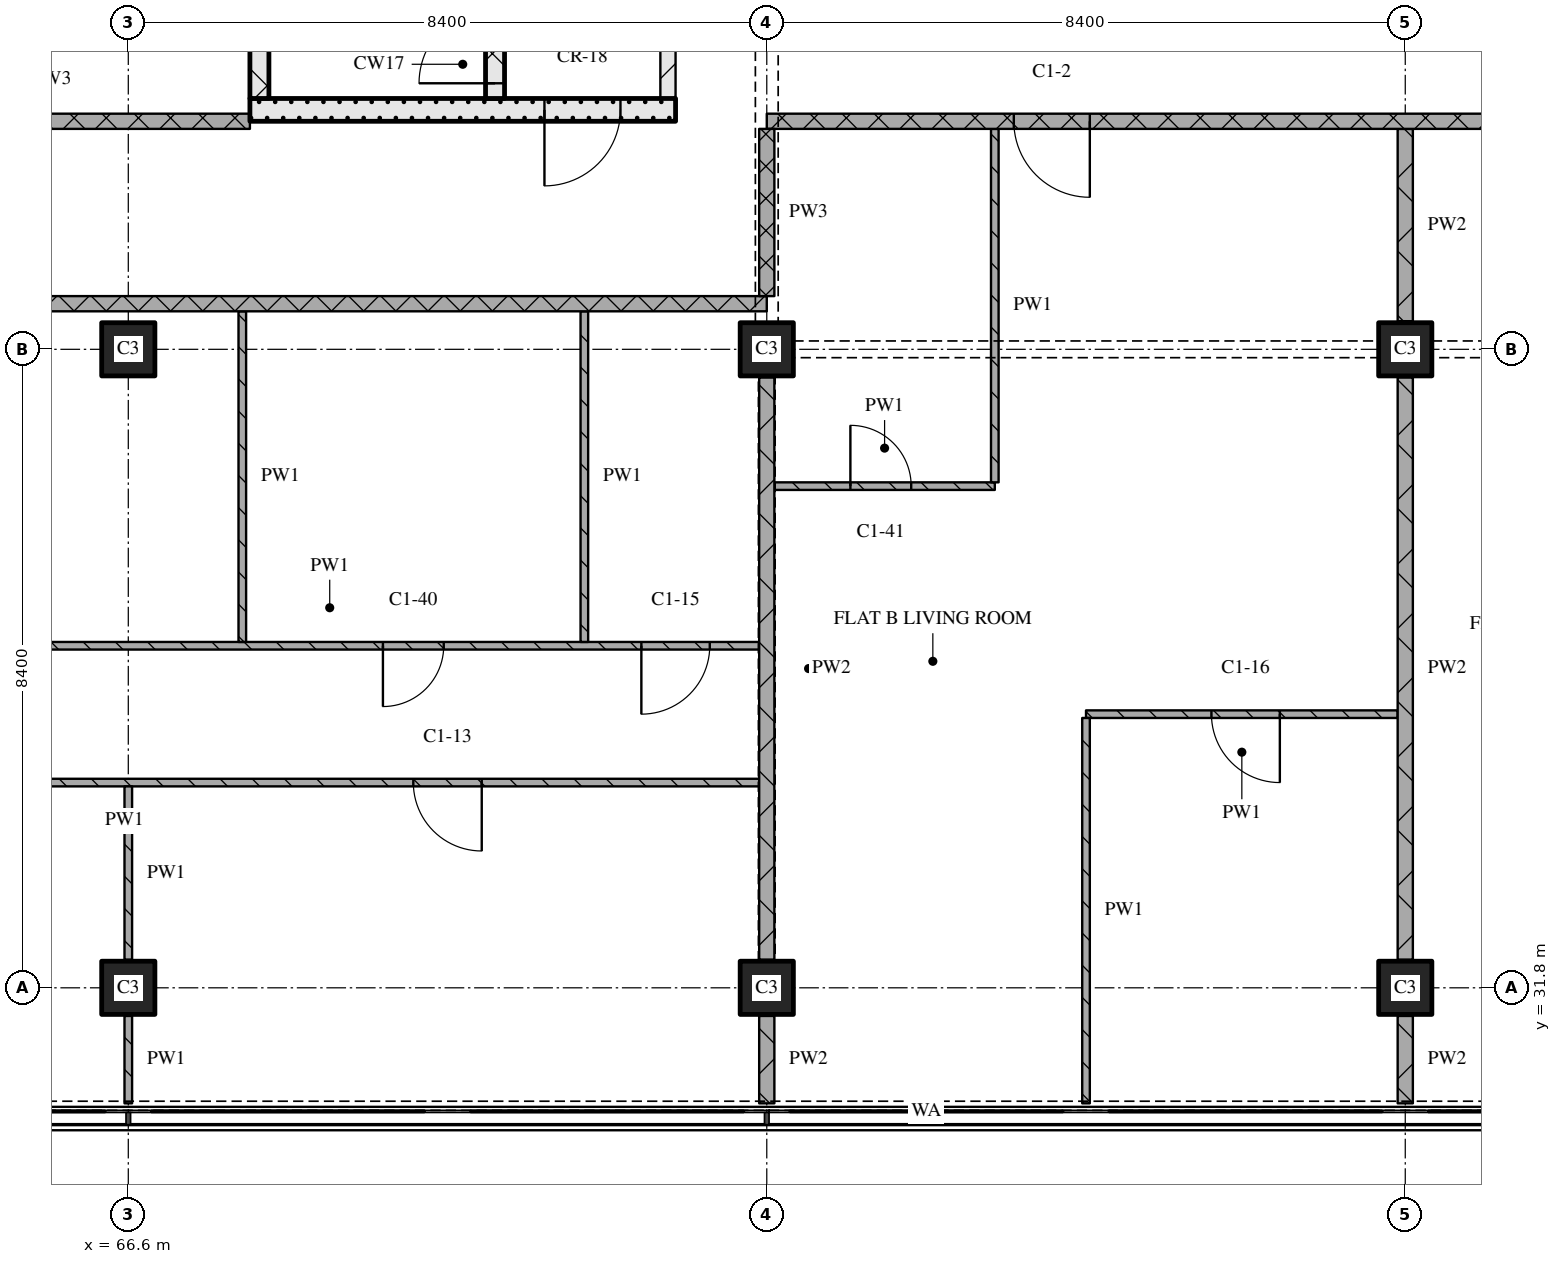
"""IFC4 building model, lengths in metres.
Left out: names, types, materials, properties, quantities, classifications, styles, units other than length and angle.
Written with IfcOpenShell. Run it as: python <this file> out.ifc"""

import sys

from ifc_helpers import new_model, si_unit, direction, frame, frame_2d, origin, origin_2d, place, context, subcontext, project, spatial, rectangle, extrude, element, fill, save


model = new_model("IFC4")
c1 = context("Model", 3, precision=1e-05, world=origin(), true_north=direction((0.0, 1.0)))
c2 = subcontext(c1, "Body", "Model", "MODEL_VIEW")
j1 = project(units=[si_unit("LENGTHUNIT", "METRE"), si_unit("PLANEANGLEUNIT", "RADIAN")], contexts=[c1])
p1 = place(None, origin())
s1 = spatial("IfcSite", under=j1, at=p1, CompositionType="ELEMENT")
p2 = place(p1, origin())
s2 = spatial("IfcBuilding", under=s1, at=p2, CompositionType="ELEMENT")
p3 = place(p2, frame((0.0, 0.0, 147.45)))
s3 = spatial("IfcBuildingStorey", under=s2, at=p3, CompositionType="ELEMENT", Elevation=147.45)
for number, where, z_axis, x_axis in (
    (1, (66.6, 31.8, 0.0), (0.0, 0.0, 1.0), (1.0, 0.0, 0.0)),
    (2, (66.6, 40.2, 0.0), (0.0, 0.0, 1.0), (1.0, 0.0, 0.0)),
    (3, (75.0, 31.8, 0.0), (0.0, 0.0, 1.0), (1.0, 0.0, 0.0)),
    (4, (75.0, 40.2, 0.0), (0.0, 0.0, 1.0), (1.0, 0.0, 0.0)),
    (5, (83.4, 31.8, 0.0), (0.0, 0.0, 1.0), (1.0, 0.0, 0.0)),
    (6, (83.4, 40.2, 0.0), (0.0, 0.0, 1.0), (1.0, 0.0, 0.0)),
):
    element("IfcColumn", number, at=place(p3, frame(where, z_axis=z_axis, x_axis=x_axis)), inside=s3, PredefinedType="COLUMN", context=c2, shape_type="SweptSolid", body=[
        extrude(rectangle(XDim=0.7, YDim=0.7, at=origin_2d()), origin(), (0.0, 0.0, 1.0), 3.6),
    ])
p4 = place(p3, frame((68.2, 43.35, 0.0), z_axis=(0.0, 0.0, 1.0), x_axis=(1.0, 0.0, 0.0)))
e7 = element("IfcWall", 7, at=p4, inside=s3, PredefinedType="SOLIDWALL", context=c2, shape_type="SweptSolid", body=[
    extrude(rectangle(XDim=5.6, YDim=0.3, at=frame_2d((2.8, 0.0))), origin(), (0.0, 0.0, 1.0), 3.32),
])
p5 = place(p4, frame((3.875, 0.0, 0.0)))
e8 = element("IfcOpeningElement", 8, at=p5, cuts=e7, PredefinedType="OPENING", context=c2, shape_type="SweptSolid", body=[
    extrude(rectangle(XDim=1.0, YDim=2.1, at=frame_2d((0.5, 1.05))), frame((0.0, 0.16, 0.0), z_axis=(0.0, -1.0, 0.0), x_axis=(1.0, 0.0, 0.0)), (0.0, 0.0, 1.0), 0.32),
])
p6 = place(p3, frame((68.325, 43.5, 0.0), z_axis=(0.0, 0.0, 1.0), x_axis=(0.0, 1.0, 0.0)))
e9 = element("IfcWall", 9, at=p6, inside=s3, PredefinedType="SOLIDWALL", context=c2, shape_type="SweptSolid", body=[
    extrude(rectangle(XDim=6.9, YDim=0.25, at=frame_2d((3.45, 0.0))), origin(), (0.0, 0.0, 1.0), 3.32),
])
p7 = place(p3, frame((71.425, 43.5, 0.0), z_axis=(0.0, 0.0, 1.0), x_axis=(0.0, 1.0, 0.0)))
e10 = element("IfcWall", 10, at=p7, inside=s3, PredefinedType="SOLIDWALL", context=c2, shape_type="SweptSolid", body=[
    extrude(rectangle(XDim=6.9, YDim=0.25, at=frame_2d((3.45, 0.0))), origin(), (0.0, 0.0, 1.0), 3.32),
])
p8 = place(p7, frame((0.2, 0.0, 0.0)))
e11 = element("IfcOpeningElement", 11, at=p8, cuts=e10, PredefinedType="OPENING", context=c2, shape_type="SweptSolid", body=[
    extrude(rectangle(XDim=1.0, YDim=2.1, at=frame_2d((0.5, 1.05))), frame((0.0, 0.135, 0.0), z_axis=(0.0, -1.0, 0.0), x_axis=(1.0, 0.0, 0.0)), (0.0, 0.0, 1.0), 0.27),
])
p9 = place(p3, frame((73.7, 43.5, 0.0), z_axis=(0.0, 0.0, 1.0), x_axis=(0.0, 1.0, 0.0)))
e12 = element("IfcWall", 12, at=p9, inside=s3, PredefinedType="PARTITIONING", context=c2, shape_type="SweptSolid", body=[
    extrude(rectangle(XDim=6.9, YDim=0.2, at=frame_2d((3.45, 0.0))), origin(), (0.0, 0.0, 1.0), 3.32),
])
p10 = place(p9, frame((1.0, 0.0, 0.0)))
e13 = element("IfcOpeningElement", 13, at=p10, cuts=e12, PredefinedType="OPENING", context=c2, shape_type="SweptSolid", body=[
    extrude(rectangle(XDim=1.0, YDim=2.1, at=frame_2d((0.5, 1.05))), frame((0.0, 0.11, 0.0), z_axis=(0.0, -1.0, 0.0), x_axis=(1.0, 0.0, 0.0)), (0.0, 0.0, 1.0), 0.22),
])
p11 = place(p3, frame((74.9, 34.5, 0.0), z_axis=(0.0, 0.0, 1.0), x_axis=(-1.0, 0.0, 0.0)))
e14 = element("IfcWall", 14, at=p11, inside=s3, PredefinedType="PARTITIONING", context=c2, shape_type="SweptSolid", body=[
    extrude(rectangle(XDim=16.7, YDim=0.1, at=frame_2d((8.35, 0.0))), origin(), (0.0, 0.0, 1.0), 3.32),
])
p12 = place(p11, frame((3.65, 0.0, 0.0)))
e15 = element("IfcOpeningElement", 15, at=p12, cuts=e14, PredefinedType="OPENING", context=c2, shape_type="SweptSolid", body=[
    extrude(rectangle(XDim=0.9, YDim=2.1, at=frame_2d((0.45, 1.05))), frame((0.0, 0.06, 0.0), z_axis=(0.0, -1.0, 0.0), x_axis=(1.0, 0.0, 0.0)), (0.0, 0.0, 1.0), 0.12),
])
p13 = place(p11, frame((12.05, 0.0, 0.0)))
e16 = element("IfcOpeningElement", 16, at=p13, cuts=e14, PredefinedType="OPENING", context=c2, shape_type="SweptSolid", body=[
    extrude(rectangle(XDim=0.9, YDim=2.1, at=frame_2d((0.45, 1.05))), frame((0.0, 0.06, 0.0), z_axis=(0.0, -1.0, 0.0), x_axis=(1.0, 0.0, 0.0)), (0.0, 0.0, 1.0), 0.12),
])
p14 = place(p3, frame((83.3, 35.4, 0.0), z_axis=(0.0, 0.0, 1.0), x_axis=(-1.0, 0.0, 0.0)))
e17 = element("IfcWall", 17, at=p14, inside=s3, PredefinedType="PARTITIONING", context=c2, shape_type="SweptSolid", body=[
    extrude(rectangle(XDim=4.1, YDim=0.1, at=frame_2d((2.05, 0.0))), origin(), (0.0, 0.0, 1.0), 3.32),
])
p15 = place(p14, frame((1.55, 0.0, 0.0)))
e18 = element("IfcOpeningElement", 18, at=p15, cuts=e17, PredefinedType="OPENING", context=c2, shape_type="SweptSolid", body=[
    extrude(rectangle(XDim=0.9, YDim=2.1, at=frame_2d((0.45, 1.05))), frame((0.0, 0.06, 0.0), z_axis=(0.0, -1.0, 0.0), x_axis=(1.0, 0.0, 0.0)), (0.0, 0.0, 1.0), 0.12),
])
p16 = place(p3, frame((63.6, 36.3, 0.0), z_axis=(0.0, 0.0, 1.0), x_axis=(1.0, 0.0, 0.0)))
e19 = element("IfcWall", 19, at=p16, inside=s3, PredefinedType="PARTITIONING", context=c2, shape_type="SweptSolid", body=[
    extrude(rectangle(XDim=11.3, YDim=0.1, at=frame_2d((5.65, 0.0))), origin(), (0.0, 0.0, 1.0), 3.32),
])
p17 = place(p16, frame((6.35, 0.0, 0.0)))
e20 = element("IfcOpeningElement", 20, at=p17, cuts=e19, PredefinedType="OPENING", context=c2, shape_type="SweptSolid", body=[
    extrude(rectangle(XDim=0.8, YDim=2.1, at=frame_2d((0.4, 1.05))), frame((0.0, 0.06, 0.0), z_axis=(0.0, -1.0, 0.0), x_axis=(1.0, 0.0, 0.0)), (0.0, 0.0, 1.0), 0.12),
])
p18 = place(p16, frame((9.75, 0.0, 0.0)))
e21 = element("IfcOpeningElement", 21, at=p18, cuts=e19, PredefinedType="OPENING", context=c2, shape_type="SweptSolid", body=[
    extrude(rectangle(XDim=0.9, YDim=2.1, at=frame_2d((0.45, 1.05))), frame((0.0, 0.06, 0.0), z_axis=(0.0, -1.0, 0.0), x_axis=(1.0, 0.0, 0.0)), (0.0, 0.0, 1.0), 0.12),
])
p19 = place(p3, frame((75.1, 38.4, 0.0), z_axis=(0.0, 0.0, 1.0), x_axis=(1.0, 0.0, 0.0)))
e22 = element("IfcWall", 22, at=p19, inside=s3, PredefinedType="PARTITIONING", context=c2, shape_type="SweptSolid", body=[
    extrude(rectangle(XDim=2.9, YDim=0.1, at=frame_2d((1.45, 0.0))), origin(), (0.0, 0.0, 1.0), 3.32),
])
p20 = place(p19, frame((1.0, 0.0, 0.0)))
e23 = element("IfcOpeningElement", 23, at=p20, cuts=e22, PredefinedType="OPENING", context=c2, shape_type="SweptSolid", body=[
    extrude(rectangle(XDim=0.8, YDim=2.1, at=frame_2d((0.4, 1.05))), frame((0.0, 0.06, 0.0), z_axis=(0.0, -1.0, 0.0), x_axis=(1.0, 0.0, 0.0)), (0.0, 0.0, 1.0), 0.12),
])
p21 = place(p3, frame((75.0, 40.8, 0.0), z_axis=(0.0, 0.0, 1.0), x_axis=(-1.0, 0.0, 0.0)))
e24 = element("IfcWall", 24, at=p21, inside=s3, PredefinedType="PARTITIONING", context=c2, shape_type="SweptSolid", body=[
    extrude(rectangle(XDim=24.28, YDim=0.2, at=frame_2d((12.14, 0.0))), origin(), (0.0, 0.0, 1.0), 3.32),
])
p22 = place(p21, frame((11.65, 0.0, 0.0)))
e25 = element("IfcOpeningElement", 25, at=p22, cuts=e24, PredefinedType="OPENING", context=c2, shape_type="SweptSolid", body=[
    extrude(rectangle(XDim=1.0, YDim=2.1, at=frame_2d((0.5, 1.05))), frame((0.0, 0.11, 0.0), z_axis=(0.0, -1.0, 0.0), x_axis=(1.0, 0.0, 0.0)), (0.0, 0.0, 1.0), 0.22),
])
p23 = place(p3, frame((63.0, 43.2, 0.0), z_axis=(0.0, 0.0, 1.0), x_axis=(1.0, 0.0, 0.0)))
e26 = element("IfcWall", 26, at=p23, inside=s3, PredefinedType="PARTITIONING", context=c2, shape_type="SweptSolid", body=[
    extrude(rectangle(XDim=5.2, YDim=0.2, at=frame_2d((2.6, 0.0))), origin(), (0.0, 0.0, 1.0), 3.32),
])
p24 = place(p3, frame((100.2, 43.2, 0.0), z_axis=(0.0, 0.0, 1.0), x_axis=(-1.0, 0.0, 0.0)))
e27 = element("IfcWall", 27, at=p24, inside=s3, PredefinedType="PARTITIONING", context=c2, shape_type="SweptSolid", body=[
    extrude(rectangle(XDim=25.2, YDim=0.2, at=frame_2d((12.6, 0.0))), origin(), (0.0, 0.0, 1.0), 3.32),
])
p25 = place(p24, frame((7.45, 0.0, 0.0)))
e28 = element("IfcOpeningElement", 28, at=p25, cuts=e27, PredefinedType="OPENING", context=c2, shape_type="SweptSolid", body=[
    extrude(rectangle(XDim=1.0, YDim=2.1, at=frame_2d((0.5, 1.05))), frame((0.0, 0.11, 0.0), z_axis=(0.0, -1.0, 0.0), x_axis=(1.0, 0.0, 0.0)), (0.0, 0.0, 1.0), 0.22),
])
p26 = place(p24, frame((20.95, 0.0, 0.0)))
e29 = element("IfcOpeningElement", 29, at=p26, cuts=e27, PredefinedType="OPENING", context=c2, shape_type="SweptSolid", body=[
    extrude(rectangle(XDim=1.0, YDim=2.1, at=frame_2d((0.5, 1.05))), frame((0.0, 0.11, 0.0), z_axis=(0.0, -1.0, 0.0), x_axis=(1.0, 0.0, 0.0)), (0.0, 0.0, 1.0), 0.22),
])
p27 = place(p3, frame((66.6, 31.43, 0.0), z_axis=(0.0, 0.0, 1.0), x_axis=(0.0, -1.0, 0.0)))
e30 = element("IfcWall", 30, at=p27, inside=s3, PredefinedType="PARTITIONING", context=c2, shape_type="SweptSolid", body=[
    extrude(rectangle(XDim=1.15, YDim=0.1, at=frame_2d((0.575, 0.0))), origin(), (0.0, 0.0, 1.0), 3.32),
])
p28 = place(p3, frame((66.6, 34.45, 0.0), z_axis=(0.0, 0.0, 1.0), x_axis=(0.0, -1.0, 0.0)))
e31 = element("IfcWall", 31, at=p28, inside=s3, PredefinedType="PARTITIONING", context=c2, shape_type="SweptSolid", body=[
    extrude(rectangle(XDim=2.28, YDim=0.1, at=frame_2d((1.14, 0.0))), origin(), (0.0, 0.0, 1.0), 3.32),
])
for number, where, z_axis, x_axis in (
    (32, (68.1, 40.7, 0.0), (0.0, 0.0, 1.0), (0.0, -1.0, 0.0)),
    (33, (72.6, 40.7, 0.0), (0.0, 0.0, 1.0), (0.0, -1.0, 0.0)),
):
    element("IfcWall", number, at=place(p3, frame(where, z_axis=z_axis, x_axis=x_axis)), inside=s3, PredefinedType="PARTITIONING", context=c2, shape_type="SweptSolid", body=[
        extrude(rectangle(XDim=4.35, YDim=0.1, at=frame_2d((2.175, 0.0))), origin(), (0.0, 0.0, 1.0), 3.32),
    ])
p29 = place(p3, frame((75.0, 43.1, 0.0), z_axis=(0.0, 0.0, 1.0), x_axis=(0.0, -1.0, 0.0)))
e34 = element("IfcWall", 34, at=p29, inside=s3, PredefinedType="PARTITIONING", context=c2, shape_type="SweptSolid", body=[
    extrude(rectangle(XDim=2.2, YDim=0.2, at=frame_2d((1.1, 0.0))), origin(), (0.0, 0.0, 1.0), 2.43),
])
p30 = place(p3, frame((75.0, 31.43, 0.0), z_axis=(0.0, 0.0, 1.0), x_axis=(0.0, -1.0, 0.0)))
e35 = element("IfcWall", 35, at=p30, inside=s3, PredefinedType="PARTITIONING", context=c2, shape_type="SweptSolid", body=[
    extrude(rectangle(XDim=1.15, YDim=0.2, at=frame_2d((0.575, 0.0))), origin(), (0.0, 0.0, 1.0), 3.32),
])
p31 = place(p3, frame((75.0, 39.83, 0.0), z_axis=(0.0, 0.0, 1.0), x_axis=(0.0, -1.0, 0.0)))
e36 = element("IfcWall", 36, at=p31, inside=s3, PredefinedType="PARTITIONING", context=c2, shape_type="SweptSolid", body=[
    extrude(rectangle(XDim=7.66, YDim=0.2, at=frame_2d((3.83, 0.0))), origin(), (0.0, 0.0, 1.0), 2.72),
])
p32 = place(p3, frame((78.0, 43.1, 0.0), z_axis=(0.0, 0.0, 1.0), x_axis=(0.0, -1.0, 0.0)))
e37 = element("IfcWall", 37, at=p32, inside=s3, PredefinedType="PARTITIONING", context=c2, shape_type="SweptSolid", body=[
    extrude(rectangle(XDim=4.65, YDim=0.1, at=frame_2d((2.325, 0.0))), origin(), (0.0, 0.0, 1.0), 3.32),
])
p33 = place(p3, frame((79.2, 35.35, 0.0), z_axis=(0.0, 0.0, 1.0), x_axis=(0.0, -1.0, 0.0)))
e38 = element("IfcWall", 38, at=p33, inside=s3, PredefinedType="PARTITIONING", context=c2, shape_type="SweptSolid", body=[
    extrude(rectangle(XDim=5.07, YDim=0.1, at=frame_2d((2.535, 0.0))), origin(), (0.0, 0.0, 1.0), 3.32),
])
p34 = place(p3, frame((83.4, 31.43, 0.0), z_axis=(0.0, 0.0, 1.0), x_axis=(0.0, -1.0, 0.0)))
e39 = element("IfcWall", 39, at=p34, inside=s3, PredefinedType="PARTITIONING", context=c2, shape_type="SweptSolid", body=[
    extrude(rectangle(XDim=1.15, YDim=0.2, at=frame_2d((0.575, 0.0))), origin(), (0.0, 0.0, 1.0), 3.32),
])
p35 = place(p3, frame((83.4, 39.83, 0.0), z_axis=(0.0, 0.0, 1.0), x_axis=(0.0, -1.0, 0.0)))
e40 = element("IfcWall", 40, at=p35, inside=s3, PredefinedType="PARTITIONING", context=c2, shape_type="SweptSolid", body=[
    extrude(rectangle(XDim=7.66, YDim=0.2, at=frame_2d((3.83, 0.0))), origin(), (0.0, 0.0, 1.0), 3.32),
])
p36 = place(p3, frame((83.4, 43.1, 0.0), z_axis=(0.0, 0.0, 1.0), x_axis=(0.0, -1.0, 0.0)))
e41 = element("IfcWall", 41, at=p36, inside=s3, PredefinedType="PARTITIONING", context=c2, shape_type="SweptSolid", body=[
    extrude(rectangle(XDim=2.53, YDim=0.2, at=frame_2d((1.265, 0.0))), origin(), (0.0, 0.0, 1.0), 3.32),
])
p37 = place(p5, origin())
e42 = element("IfcDoor", 42, at=p37, inside=s3, OperationType="SINGLE_SWING_RIGHT", PredefinedType="DOOR", context=c2, shape_type="SweptSolid", body=[
    extrude(rectangle(XDim=1.0, YDim=2.1, at=frame_2d((0.5, 1.05))), frame((0.0, 0.025, 0.0), z_axis=(0.0, -1.0, 0.0), x_axis=(1.0, 0.0, 0.0)), (0.0, 0.0, 1.0), 0.05),
])
fill(e8, e42)
p38 = place(p8, origin())
e43 = element("IfcDoor", 43, at=p38, inside=s3, OperationType="SINGLE_SWING_LEFT", PredefinedType="DOOR", context=c2, shape_type="SweptSolid", body=[
    extrude(rectangle(XDim=1.0, YDim=2.1, at=frame_2d((0.5, 1.05))), frame((0.0, 0.025, 0.0), z_axis=(0.0, -1.0, 0.0), x_axis=(1.0, 0.0, 0.0)), (0.0, 0.0, 1.0), 0.05),
])
fill(e11, e43)
p39 = place(p12, origin())
e44 = element("IfcDoor", 44, at=p39, inside=s3, OperationType="SINGLE_SWING_LEFT", PredefinedType="DOOR", context=c2, shape_type="SweptSolid", body=[
    extrude(rectangle(XDim=0.9, YDim=2.1, at=frame_2d((0.45, 1.05))), frame((0.0, 0.025, 0.0), z_axis=(0.0, -1.0, 0.0), x_axis=(1.0, 0.0, 0.0)), (0.0, 0.0, 1.0), 0.05),
])
fill(e15, e44)
p40 = place(p15, origin())
e45 = element("IfcDoor", 45, at=p40, inside=s3, OperationType="SINGLE_SWING_LEFT", PredefinedType="DOOR", context=c2, shape_type="SweptSolid", body=[
    extrude(rectangle(XDim=0.9, YDim=2.1, at=frame_2d((0.45, 1.05))), frame((0.0, 0.025, 0.0), z_axis=(0.0, -1.0, 0.0), x_axis=(1.0, 0.0, 0.0)), (0.0, 0.0, 1.0), 0.05),
])
fill(e18, e45)
p41 = place(p17, origin())
e46 = element("IfcDoor", 46, at=p41, inside=s3, OperationType="SINGLE_SWING_RIGHT", PredefinedType="DOOR", context=c2, shape_type="SweptSolid", body=[
    extrude(rectangle(XDim=0.8, YDim=2.1, at=frame_2d((0.4, 1.05))), frame((0.0, 0.025, 0.0), z_axis=(0.0, -1.0, 0.0), x_axis=(1.0, 0.0, 0.0)), (0.0, 0.0, 1.0), 0.05),
])
fill(e20, e46)
p42 = place(p18, origin())
e47 = element("IfcDoor", 47, at=p42, inside=s3, OperationType="SINGLE_SWING_RIGHT", PredefinedType="DOOR", context=c2, shape_type="SweptSolid", body=[
    extrude(rectangle(XDim=0.9, YDim=2.1, at=frame_2d((0.45, 1.05))), frame((0.0, 0.025, 0.0), z_axis=(0.0, -1.0, 0.0), x_axis=(1.0, 0.0, 0.0)), (0.0, 0.0, 1.0), 0.05),
])
fill(e21, e47)
p43 = place(p20, origin())
e48 = element("IfcDoor", 48, at=p43, inside=s3, OperationType="SINGLE_SWING_LEFT", PredefinedType="DOOR", context=c2, shape_type="SweptSolid", body=[
    extrude(rectangle(XDim=0.8, YDim=2.1, at=frame_2d((0.4, 1.05))), frame((0.0, 0.025, 0.0), z_axis=(0.0, -1.0, 0.0), x_axis=(1.0, 0.0, 0.0)), (0.0, 0.0, 1.0), 0.05),
])
fill(e23, e48)
p44 = place(p26, origin())
e49 = element("IfcDoor", 49, at=p44, inside=s3, OperationType="SINGLE_SWING_LEFT", PredefinedType="DOOR", context=c2, shape_type="SweptSolid", body=[
    extrude(rectangle(XDim=1.0, YDim=2.1, at=frame_2d((0.5, 1.05))), frame((0.0, 0.025, 0.0), z_axis=(0.0, -1.0, 0.0), x_axis=(1.0, 0.0, 0.0)), (0.0, 0.0, 1.0), 0.05),
])
fill(e29, e49)
save(model, sys.argv[1])
